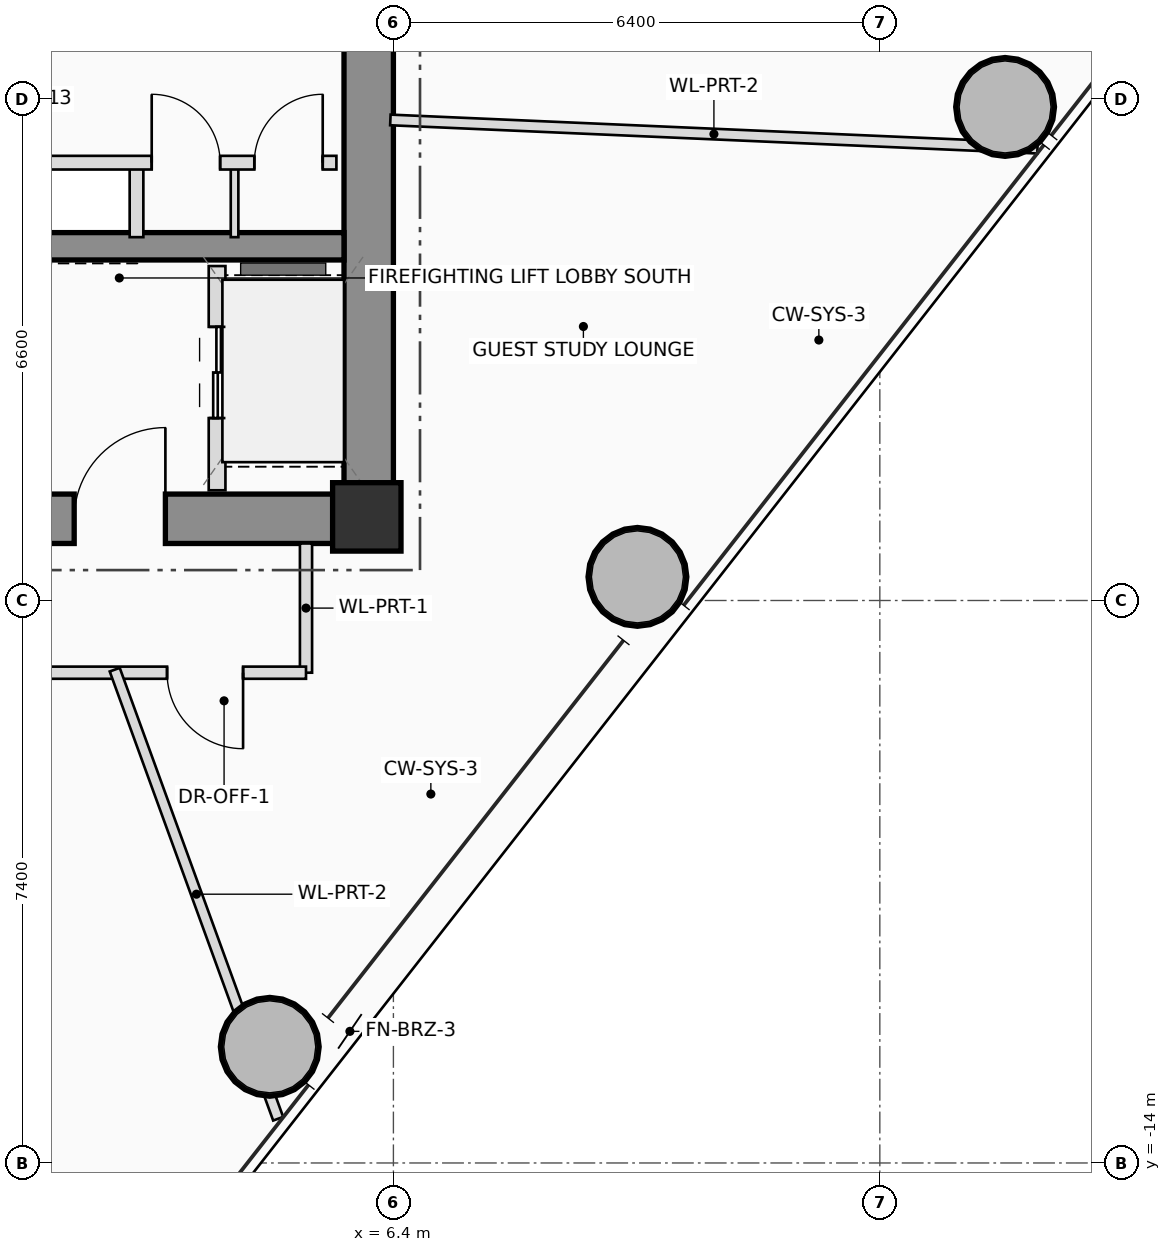
"""IFC4 building model, lengths in metres.
Left out: names, types, materials, properties, quantities, classifications, styles, units other than length and angle.
Written with IfcOpenShell. Run it as: python <this file> out.ifc"""

import sys

from ifc_helpers import new_model, si_unit, direction, frame, frame_2d, origin, origin_2d, place, context, subcontext, project, spatial, rectangle, hollow_circle, extrude, source, transform, mapped, element, fill, save


model = new_model("IFC4")
c1 = context("Model", 3, precision=1e-05, world=origin(), true_north=direction((0.0, 1.0)))
c2 = subcontext(c1, "Body", "Model", "MODEL_VIEW")
j1 = project(units=[si_unit("LENGTHUNIT", "METRE"), si_unit("PLANEANGLEUNIT", "RADIAN")], contexts=[c1])
p1 = place(None, origin())
s1 = spatial("IfcSite", under=j1, at=p1, CompositionType="ELEMENT")
p2 = place(p1, origin())
s2 = spatial("IfcBuilding", under=s1, at=p2, CompositionType="ELEMENT")
p3 = place(p2, frame((0.0, 0.0, 136.4)))
s3 = spatial("IfcBuildingStorey", under=s2, at=p3, CompositionType="ELEMENT", Elevation=136.4)
m1 = source(origin(), c2, "Body", "SweptSolid", [
    extrude(rectangle(XDim=0.9, YDim=0.9, at=origin_2d()), origin(), (0.0, 0.0, 1.0), 3.45),
])
p4 = place(p3, frame((6.05, -5.5, 0.0), z_axis=(0.0, 0.0, 1.0), x_axis=(1.0, 0.0, 0.0)))
e1 = element("IfcColumn", 1, at=p4, inside=s3, PredefinedType="COLUMN", context=c2, shape_type="MappedRepresentation", body=[
    mapped(m1, transform((0.0, 0.0, 0.0), scale=1.0)),
])
p5 = place(p3, frame((-6.4, -5.525, 0.0), z_axis=(0.0, 0.0, 1.0), x_axis=(1.0, 0.0, 0.0)))
e2 = element("IfcWall", 2, at=p5, inside=s3, PredefinedType="SHEAR", context=c2, shape_type="SweptSolid", body=[
    extrude(rectangle(XDim=12.8, YDim=0.65, at=frame_2d((6.4, 0.0))), origin(), (0.0, 0.0, 1.0), 3.45),
])
p6 = place(p5, frame((8.6, 0.0, 0.0)))
e3 = element("IfcOpeningElement", 3, at=p6, cuts=e2, PredefinedType="OPENING", context=c2, shape_type="SweptSolid", body=[
    extrude(rectangle(XDim=1.2, YDim=2.2, at=frame_2d((0.6, 1.1))), frame((0.0, 0.335, 0.0), z_axis=(0.0, -1.0, 0.0), x_axis=(1.0, 0.0, 0.0)), (0.0, 0.0, 1.0), 0.67),
])
p7 = place(p3, frame((6.075, -5.2, 0.0), z_axis=(0.0, 0.0, 1.0), x_axis=(0.0, 1.0, 0.0)))
e4 = element("IfcWall", 4, at=p7, inside=s3, PredefinedType="SHEAR", context=c2, shape_type="SweptSolid", body=[
    extrude(rectangle(XDim=10.4, YDim=0.65, at=frame_2d((5.2, 0.0))), origin(), (0.0, 0.0, 1.0), 3.45),
])
p8 = place(p3, frame((-5.75, -1.94, 0.0), z_axis=(0.0, 0.0, 1.0), x_axis=(1.0, 0.0, 0.0)))
e5 = element("IfcWall", 5, at=p8, inside=s3, PredefinedType="SHEAR", context=c2, shape_type="SweptSolid", body=[
    extrude(rectangle(XDim=11.5, YDim=0.36, at=frame_2d((5.75, 0.0))), origin(), (0.0, 0.0, 1.0), 3.45),
])
m2 = source(origin(), c2, "Body", "SweptSolid", [
    extrude(hollow_circle(Radius=0.65, WallThickness=0.045, at=origin_2d()), origin(), (0.0, 0.0, 1.0), 3.45),
])
for number, where, z_axis, x_axis in (
    (6, (4.773, -12.472, 0.0), (0.0, 0.0, 1.0), (1.0, 0.0, 0.0)),
    (7, (9.611, -6.289, 0.0), (0.0, 0.0, 1.0), (1.0, 0.0, 0.0)),
    (8, (14.448, -0.107, 0.0), (0.0, 0.0, 1.0), (1.0, 0.0, 0.0)),
):
    element("IfcColumn", number, at=place(p3, frame(where, z_axis=z_axis, x_axis=x_axis)), inside=s3, PredefinedType="COLUMN", context=c2, shape_type="MappedRepresentation", body=[
        mapped(m2, transform((0.0, 0.0, 0.0), scale=1.0)),
    ])
p9 = place(p3, frame((4.08, -5.15, 0.0), z_axis=(0.0, 0.0, 1.0), x_axis=(0.0, 1.0, 0.0)))
e9 = element("IfcWall", 9, at=p9, inside=s3, PredefinedType="PLUMBINGWALL", context=c2, shape_type="SweptSolid", body=[
    extrude(rectangle(XDim=2.95, YDim=0.22, at=frame_2d((1.475, 0.0))), origin(), (0.0, 0.0, 1.0), 3.25),
])
p10 = place(p9, frame((0.95, 0.0, 0.0)))
e10 = element("IfcOpeningElement", 10, at=p10, cuts=e9, PredefinedType="OPENING", context=c2, shape_type="SweptSolid", body=[
    extrude(rectangle(XDim=1.2, YDim=2.25, at=frame_2d((0.6, 1.125))), frame((0.0, 0.12, 0.0), z_axis=(0.0, -1.0, 0.0), x_axis=(1.0, 0.0, 0.0)), (0.0, 0.0, 1.0), 0.24),
])
p11 = place(p3, frame((3.02, -1.82, 0.0), z_axis=(0.0, 0.0, 1.0), x_axis=(0.0, 1.0, 0.0)))
e11 = element("IfcWall", 11, at=p11, inside=s3, PredefinedType="PLUMBINGWALL", context=c2, shape_type="SweptSolid", body=[
    extrude(rectangle(XDim=0.98, YDim=0.18, at=frame_2d((0.49, 0.0))), origin(), (0.0, 0.0, 1.0), 3.25),
])
p12 = place(p3, frame((4.31, -1.82, 0.0), z_axis=(0.0, 0.0, 1.0), x_axis=(0.0, 1.0, 0.0)))
e12 = element("IfcWall", 12, at=p12, inside=s3, PredefinedType="PARTITIONING", context=c2, shape_type="SweptSolid", body=[
    extrude(rectangle(XDim=0.98, YDim=0.1, at=frame_2d((0.49, 0.0))), origin(), (0.0, 0.0, 1.0), 3.25),
])
p13 = place(p3, frame((-5.68, -0.84, 0.0), z_axis=(0.0, 0.0, 1.0), x_axis=(1.0, 0.0, 0.0)))
e13 = element("IfcWall", 13, at=p13, inside=s3, PredefinedType="PLUMBINGWALL", context=c2, shape_type="SweptSolid", body=[
    extrude(rectangle(XDim=11.33, YDim=0.18, at=frame_2d((5.665, 0.0))), origin(), (0.0, 0.0, 1.0), 3.25),
])
p14 = place(p13, frame((1.18, 0.0, 0.0)))
e14 = element("IfcOpeningElement", 14, at=p14, cuts=e13, PredefinedType="OPENING", context=c2, shape_type="SweptSolid", body=[
    extrude(rectangle(XDim=0.9, YDim=2.05, at=frame_2d((0.45, 1.025))), frame((0.0, 0.1, 0.0), z_axis=(0.0, -1.0, 0.0), x_axis=(1.0, 0.0, 0.0)), (0.0, 0.0, 1.0), 0.2),
])
p15 = place(p13, frame((3.93, 0.0, 0.0)))
e15 = element("IfcOpeningElement", 15, at=p15, cuts=e13, PredefinedType="OPENING", context=c2, shape_type="SweptSolid", body=[
    extrude(rectangle(XDim=1.1, YDim=2.2, at=frame_2d((0.55, 1.1))), frame((0.0, 0.1, 0.0), z_axis=(0.0, -1.0, 0.0), x_axis=(1.0, 0.0, 0.0)), (0.0, 0.0, 1.0), 0.2),
])
p16 = place(p13, frame((5.63, 0.0, 0.0)))
e16 = element("IfcOpeningElement", 16, at=p16, cuts=e13, PredefinedType="OPENING", context=c2, shape_type="SweptSolid", body=[
    extrude(rectangle(XDim=1.1, YDim=2.2, at=frame_2d((0.55, 1.1))), frame((0.0, 0.1, 0.0), z_axis=(0.0, -1.0, 0.0), x_axis=(1.0, 0.0, 0.0)), (0.0, 0.0, 1.0), 0.2),
])
p17 = place(p13, frame((8.9, 0.0, 0.0)))
e17 = element("IfcOpeningElement", 17, at=p17, cuts=e13, PredefinedType="OPENING", context=c2, shape_type="SweptSolid", body=[
    extrude(rectangle(XDim=0.9, YDim=2.05, at=frame_2d((0.45, 1.025))), frame((0.0, 0.1, 0.0), z_axis=(0.0, -1.0, 0.0), x_axis=(1.0, 0.0, 0.0)), (0.0, 0.0, 1.0), 0.2),
])
p18 = place(p13, frame((10.25, 0.0, 0.0)))
e18 = element("IfcOpeningElement", 18, at=p18, cuts=e13, PredefinedType="OPENING", context=c2, shape_type="SweptSolid", body=[
    extrude(rectangle(XDim=0.9, YDim=2.05, at=frame_2d((0.45, 1.025))), frame((0.0, 0.1, 0.0), z_axis=(0.0, -1.0, 0.0), x_axis=(1.0, 0.0, 0.0)), (0.0, 0.0, 1.0), 0.2),
])
p19 = place(p3, frame((5.25, -5.85, 0.0), z_axis=(0.0, 0.0, 1.0), x_axis=(0.0, -1.0, 0.0)))
e19 = element("IfcWall", 19, at=p19, inside=s3, PredefinedType="PARTITIONING", context=c2, shape_type="SweptSolid", body=[
    extrude(rectangle(XDim=1.7, YDim=0.16, at=frame_2d((0.85, 0.0))), origin(), (0.0, 0.0, 1.0), 3.25),
])
p20 = place(p3, frame((5.25, -7.55, 0.0), z_axis=(0.0, 0.0, 1.0), x_axis=(-1.0, 0.0, 0.0)))
e20 = element("IfcWall", 20, at=p20, inside=s3, PredefinedType="PARTITIONING", context=c2, shape_type="SweptSolid", body=[
    extrude(rectangle(XDim=11.61, YDim=0.16, at=frame_2d((5.805, 0.0))), origin(), (0.0, 0.0, 1.0), 2.605),
])
p21 = place(p20, frame((0.828, 0.0, 0.0)))
e21 = element("IfcOpeningElement", 21, at=p21, cuts=e20, PredefinedType="OPENING", context=c2, shape_type="SweptSolid", body=[
    extrude(rectangle(XDim=1.0, YDim=2.25, at=frame_2d((0.5, 1.125))), frame((0.0, 0.09, 0.0), z_axis=(0.0, -1.0, 0.0), x_axis=(1.0, 0.0, 0.0)), (0.0, 0.0, 1.0), 0.18),
])
p22 = place(p3, frame((6.36, -0.278, 0.0), z_axis=(0.0, 0.0, 1.0), x_axis=(0.999047707238, -0.043631166178, 0.0)))
e22 = element("IfcWall", 22, at=p22, inside=s3, PredefinedType="PARTITIONING", context=c2, shape_type="SweptSolid", body=[
    extrude(rectangle(XDim=8.522, YDim=0.14, at=frame_2d((4.261, 0.0))), origin(), (0.0, 0.0, 1.0), 2.605),
])
p23 = place(p3, frame((2.733, -7.51, 0.0), z_axis=(0.0, 0.0, 1.0), x_axis=(0.342029891784, -0.93968907258, 0.0)))
e23 = element("IfcWall", 23, at=p23, inside=s3, PredefinedType="PARTITIONING", context=c2, shape_type="SweptSolid", body=[
    extrude(rectangle(XDim=6.287, YDim=0.14, at=frame_2d((3.144, 0.0))), origin(), (0.0, 0.0, 1.0), 2.805),
])
p24 = place(p6, origin())
e24 = element("IfcDoor", 24, at=p24, inside=s3, OperationType="SINGLE_SWING_RIGHT", PredefinedType="DOOR", context=c2, shape_type="SweptSolid", body=[
    extrude(rectangle(XDim=1.2, YDim=2.2, at=frame_2d((0.6, 1.1))), frame((0.0, 0.025, 0.0), z_axis=(0.0, -1.0, 0.0), x_axis=(1.0, 0.0, 0.0)), (0.0, 0.0, 1.0), 0.05),
])
fill(e3, e24)
p25 = place(p10, origin())
e25 = element("IfcDoor", 25, at=p25, inside=s3, OperationType="DOUBLE_DOOR_SLIDING", PredefinedType="DOOR", context=c2, shape_type="SweptSolid", body=[
    extrude(rectangle(XDim=1.2, YDim=2.25, at=frame_2d((0.6, 1.125))), frame((0.0, 0.025, 0.0), z_axis=(0.0, -1.0, 0.0), x_axis=(1.0, 0.0, 0.0)), (0.0, 0.0, 1.0), 0.05),
])
fill(e10, e25)
p26 = place(p17, origin())
e26 = element("IfcDoor", 26, at=p26, inside=s3, OperationType="SINGLE_SWING_LEFT", PredefinedType="DOOR", context=c2, shape_type="SweptSolid", body=[
    extrude(rectangle(XDim=0.9, YDim=2.05, at=frame_2d((0.45, 1.025))), frame((0.0, 0.025, 0.0), z_axis=(0.0, -1.0, 0.0), x_axis=(1.0, 0.0, 0.0)), (0.0, 0.0, 1.0), 0.05),
])
fill(e17, e26)
p27 = place(p18, origin())
e27 = element("IfcDoor", 27, at=p27, inside=s3, OperationType="SINGLE_SWING_RIGHT", PredefinedType="DOOR", context=c2, shape_type="SweptSolid", body=[
    extrude(rectangle(XDim=0.9, YDim=2.05, at=frame_2d((0.45, 1.025))), frame((0.0, 0.025, 0.0), z_axis=(0.0, -1.0, 0.0), x_axis=(1.0, 0.0, 0.0)), (0.0, 0.0, 1.0), 0.05),
])
fill(e18, e27)
p28 = place(p21, origin())
e28 = element("IfcDoor", 28, at=p28, inside=s3, OperationType="SINGLE_SWING_LEFT", PredefinedType="DOOR", context=c2, shape_type="SweptSolid", body=[
    extrude(rectangle(XDim=1.0, YDim=2.25, at=frame_2d((0.5, 1.125))), frame((0.0, 0.025, 0.0), z_axis=(0.0, -1.0, 0.0), x_axis=(1.0, 0.0, 0.0)), (0.0, 0.0, 1.0), 0.05),
])
fill(e21, e28)
save(model, sys.argv[1])
